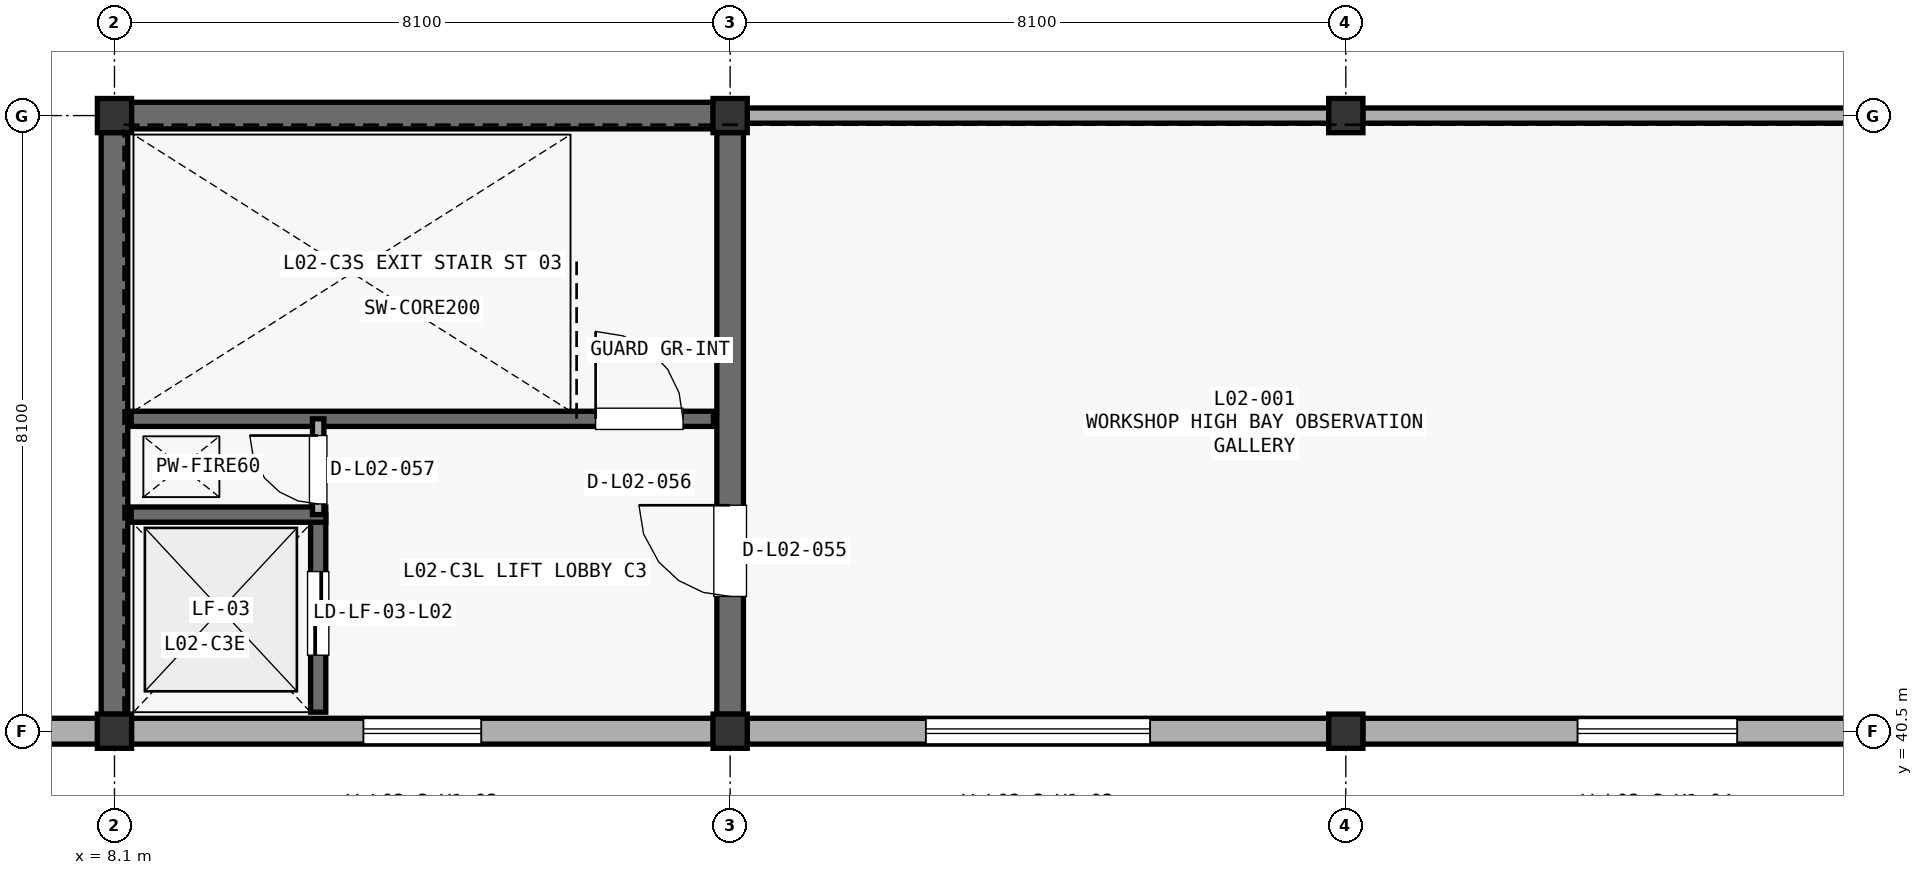
"""IFC4 building model, lengths in metres.
Left out: names, types, materials, properties, quantities, classifications, styles, units other than length and angle.
Written with IfcOpenShell. Run it as: python <this file> out.ifc"""

import sys

from ifc_helpers import new_model, si_unit, direction, frame, frame_2d, origin, origin_2d, place, context, subcontext, project, spatial, rectangle, extrude, element, fill, save


model = new_model("IFC4")
c1 = context("Model", 3, precision=1e-05, world=origin(), true_north=direction((0.0, 1.0)))
c2 = subcontext(c1, "Body", "Model", "MODEL_VIEW")
j1 = project(units=[si_unit("LENGTHUNIT", "METRE"), si_unit("PLANEANGLEUNIT", "RADIAN")], contexts=[c1])
p1 = place(None, origin())
s1 = spatial("IfcSite", under=j1, at=p1, CompositionType="ELEMENT")
p2 = place(p1, origin())
s2 = spatial("IfcBuilding", under=s1, at=p2, CompositionType="ELEMENT")
p3 = place(p2, frame((0.0, 0.0, 9.69)))
s3 = spatial("IfcBuildingStorey", under=s2, at=p3, CompositionType="ELEMENT", Elevation=9.69)
for number, where, z_axis, x_axis in (
    (1, (8.1, 40.5, 0.0), (0.0, 0.0, 1.0), (1.0, 0.0, 0.0)),
    (2, (8.1, 48.6, 0.0), (0.0, 0.0, 1.0), (1.0, 0.0, 0.0)),
    (3, (16.2, 40.5, 0.0), (0.0, 0.0, 1.0), (1.0, 0.0, 0.0)),
    (4, (16.2, 48.6, 0.0), (0.0, 0.0, 1.0), (1.0, 0.0, 0.0)),
    (5, (24.3, 40.5, 0.0), (0.0, 0.0, 1.0), (1.0, 0.0, 0.0)),
    (6, (24.3, 48.6, 0.0), (0.0, 0.0, 1.0), (1.0, 0.0, 0.0)),
):
    element("IfcColumn", number, at=place(p3, frame(where, z_axis=z_axis, x_axis=x_axis)), inside=s3, PredefinedType="COLUMN", context=c2, shape_type="SweptSolid", body=[
        extrude(rectangle(XDim=0.45, YDim=0.45, at=origin_2d()), origin(), (0.0, 0.0, 1.0), 4.42),
    ])
p4 = place(p3, frame((0.125, 40.5, -0.38), z_axis=(0.0, 0.0, 1.0), x_axis=(1.0, 0.0, 0.0)))
e7 = element("IfcWall", 7, at=p4, inside=s3, PredefinedType="STANDARD", context=c2, shape_type="SweptSolid", body=[
    extrude(rectangle(XDim=7.752, YDim=0.34, at=frame_2d((3.876, 0.0))), origin(), (0.0, 0.0, 1.0), 3.86),
])
p5 = place(p4, frame((2.826, 0.0, 1.63)))
e8 = element("IfcOpeningElement", 8, at=p5, cuts=e7, PredefinedType="OPENING", context=c2, shape_type="SweptSolid", body=[
    extrude(rectangle(XDim=2.1, YDim=1.5, at=frame_2d((1.05, 0.75))), frame((0.0, 0.18, 0.0), z_axis=(0.0, -1.0, 0.0), x_axis=(1.0, 0.0, 0.0)), (0.0, 0.0, 1.0), 0.36),
])
p6 = place(p3, frame((8.323, 40.5, 0.0), z_axis=(0.0, 0.0, 1.0), x_axis=(1.0, 0.0, 0.0)))
e9 = element("IfcWall", 9, at=p6, inside=s3, PredefinedType="STANDARD", context=c2, shape_type="SweptSolid", body=[
    extrude(rectangle(XDim=7.654, YDim=0.34, at=frame_2d((3.827, 0.0))), origin(), (0.0, 0.0, 1.0), 3.48),
])
p7 = place(p6, frame((3.052, 0.0, 1.25)))
e10 = element("IfcOpeningElement", 10, at=p7, cuts=e9, PredefinedType="OPENING", context=c2, shape_type="SweptSolid", body=[
    extrude(rectangle(XDim=1.55, YDim=1.8, at=frame_2d((0.775, 0.9))), frame((0.0, 0.18, 0.0), z_axis=(0.0, -1.0, 0.0), x_axis=(1.0, 0.0, 0.0)), (0.0, 0.0, 1.0), 0.36),
])
p8 = place(p3, frame((16.423, 40.5, 0.0), z_axis=(0.0, 0.0, 1.0), x_axis=(1.0, 0.0, 0.0)))
e11 = element("IfcWall", 11, at=p8, inside=s3, PredefinedType="STANDARD", context=c2, shape_type="SweptSolid", body=[
    extrude(rectangle(XDim=7.654, YDim=0.34, at=frame_2d((3.827, 0.0))), origin(), (0.0, 0.0, 1.0), 3.48),
])
p9 = place(p8, frame((2.352, 0.0, 1.25)))
e12 = element("IfcOpeningElement", 12, at=p9, cuts=e11, PredefinedType="OPENING", context=c2, shape_type="SweptSolid", body=[
    extrude(rectangle(XDim=2.95, YDim=1.8, at=frame_2d((1.475, 0.9))), frame((0.0, 0.18, 0.0), z_axis=(0.0, -1.0, 0.0), x_axis=(1.0, 0.0, 0.0)), (0.0, 0.0, 1.0), 0.36),
])
p10 = place(p3, frame((24.523, 40.5, 0.0), z_axis=(0.0, 0.0, 1.0), x_axis=(1.0, 0.0, 0.0)))
e13 = element("IfcWall", 13, at=p10, inside=s3, PredefinedType="STANDARD", context=c2, shape_type="SweptSolid", body=[
    extrude(rectangle(XDim=7.752, YDim=0.34, at=frame_2d((3.876, 0.0))), origin(), (0.0, 0.0, 1.0), 3.48),
])
p11 = place(p10, frame((2.826, 0.0, 1.25)))
e14 = element("IfcOpeningElement", 14, at=p11, cuts=e13, PredefinedType="OPENING", context=c2, shape_type="SweptSolid", body=[
    extrude(rectangle(XDim=2.1, YDim=1.5, at=frame_2d((1.05, 0.75))), frame((0.0, 0.18, 0.0), z_axis=(0.0, -1.0, 0.0), x_axis=(1.0, 0.0, 0.0)), (0.0, 0.0, 1.0), 0.36),
])
for number, where, z_axis, x_axis in (
    (15, (8.323, 48.6, 0.0), (0.0, 0.0, 1.0), (1.0, 0.0, 0.0)),
    (16, (8.1, 40.723, 0.0), (0.0, 0.0, 1.0), (0.0, 1.0, 0.0)),
):
    element("IfcWall", number, at=place(p3, frame(where, z_axis=z_axis, x_axis=x_axis)), inside=s3, PredefinedType="SHEAR", context=c2, shape_type="SweptSolid", body=[
        extrude(rectangle(XDim=7.654, YDim=0.35, at=frame_2d((3.827, 0.0))), origin(), (0.0, 0.0, 1.0), 4.142),
    ])
p12 = place(p3, frame((16.2, 40.723, 0.0), z_axis=(0.0, 0.0, 1.0), x_axis=(0.0, 1.0, 0.0)))
e17 = element("IfcWall", 17, at=p12, inside=s3, PredefinedType="SHEAR", context=c2, shape_type="SweptSolid", body=[
    extrude(rectangle(XDim=7.654, YDim=0.35, at=frame_2d((3.827, 0.0))), origin(), (0.0, 0.0, 1.0), 4.142),
])
p13 = place(p12, frame((1.55, 0.0, 0.0)))
e18 = element("IfcOpeningElement", 18, at=p13, cuts=e17, PredefinedType="OPENING", context=c2, shape_type="SweptSolid", body=[
    extrude(rectangle(XDim=1.2, YDim=2.2, at=frame_2d((0.6, 1.1))), frame((0.0, 0.185, 0.0), z_axis=(0.0, -1.0, 0.0), x_axis=(1.0, 0.0, 0.0)), (0.0, 0.0, 1.0), 0.37),
])
p14 = place(p3, frame((8.32, 44.61, 0.0), z_axis=(0.0, 0.0, 1.0), x_axis=(1.0, 0.0, 0.0)))
e19 = element("IfcWall", 19, at=p14, inside=s3, PredefinedType="SHEAR", context=c2, shape_type="SweptSolid", body=[
    extrude(rectangle(XDim=7.66, YDim=0.2, at=frame_2d((3.83, 0.0))), origin(), (0.0, 0.0, 1.0), 4.142),
])
p15 = place(p14, frame((6.11, 0.0, 0.0)))
e20 = element("IfcOpeningElement", 20, at=p15, cuts=e19, PredefinedType="OPENING", context=c2, shape_type="SweptSolid", body=[
    extrude(rectangle(XDim=1.15, YDim=2.2, at=frame_2d((0.575, 1.1))), frame((0.0, 0.11, 0.0), z_axis=(0.0, -1.0, 0.0), x_axis=(1.0, 0.0, 0.0)), (0.0, 0.0, 1.0), 0.22),
])
p16 = place(p3, frame((10.78, 40.75, 0.0), z_axis=(0.0, 0.0, 1.0), x_axis=(0.0, 1.0, 0.0)))
e21 = element("IfcWall", 21, at=p16, inside=s3, PredefinedType="SHEAR", context=c2, shape_type="SweptSolid", body=[
    extrude(rectangle(XDim=2.6, YDim=0.2, at=frame_2d((1.3, 0.0))), origin(), (0.0, 0.0, 1.0), 4.142),
])
p17 = place(p16, frame((0.75, 0.0, 0.0)))
e22 = element("IfcOpeningElement", 22, at=p17, cuts=e21, PredefinedType="OPENING", context=c2, shape_type="SweptSolid", body=[
    extrude(rectangle(XDim=1.1, YDim=2.2, at=frame_2d((0.55, 1.1))), frame((0.0, 0.11, 0.0), z_axis=(0.0, -1.0, 0.0), x_axis=(1.0, 0.0, 0.0)), (0.0, 0.0, 1.0), 0.22),
])
p18 = place(p3, frame((8.32, 43.35, 0.0), z_axis=(0.0, 0.0, 1.0), x_axis=(1.0, 0.0, 0.0)))
e23 = element("IfcWall", 23, at=p18, inside=s3, PredefinedType="SHEAR", context=c2, shape_type="SweptSolid", body=[
    extrude(rectangle(XDim=2.56, YDim=0.2, at=frame_2d((1.28, 0.0))), origin(), (0.0, 0.0, 1.0), 4.142),
])
p19 = place(p3, frame((10.78, 43.35, 0.0), z_axis=(0.0, 0.0, 1.0), x_axis=(0.0, 1.0, 0.0)))
e24 = element("IfcWall", 24, at=p19, inside=s3, PredefinedType="PARTITIONING", context=c2, shape_type="SweptSolid", body=[
    extrude(rectangle(XDim=1.26, YDim=0.15, at=frame_2d((0.63, 0.0))), origin(), (0.0, 0.0, 1.0), 4.142),
])
p20 = place(p19, frame((0.14, 0.0, 0.0)))
e25 = element("IfcOpeningElement", 25, at=p20, cuts=e24, PredefinedType="OPENING", context=c2, shape_type="SweptSolid", body=[
    extrude(rectangle(XDim=0.9, YDim=2.15, at=frame_2d((0.45, 1.075))), frame((0.0, 0.085, 0.0), z_axis=(0.0, -1.0, 0.0), x_axis=(1.0, 0.0, 0.0)), (0.0, 0.0, 1.0), 0.17),
])
p21 = place(p3, frame((16.423, 48.6, 0.0), z_axis=(0.0, 0.0, 1.0), x_axis=(1.0, 0.0, 0.0)))
e26 = element("IfcWall", 26, at=p21, inside=s3, PredefinedType="PARTITIONING", context=c2, shape_type="SweptSolid", body=[
    extrude(rectangle(XDim=7.654, YDim=0.2, at=frame_2d((3.827, 0.0))), origin(), (0.0, 0.0, 1.0), 4.142),
])
p22 = place(p3, frame((24.523, 48.6, 0.0), z_axis=(0.0, 0.0, 1.0), x_axis=(1.0, 0.0, 0.0)))
e27 = element("IfcWall", 27, at=p22, inside=s3, PredefinedType="PARTITIONING", context=c2, shape_type="SweptSolid", body=[
    extrude(rectangle(XDim=7.676, YDim=0.2, at=frame_2d((3.838, 0.0))), origin(), (0.0, 0.0, 1.0), 4.142),
])
p23 = place(p7, origin())
e28 = element("IfcWindow", 28, at=p23, inside=s3, PartitioningType="SINGLE_PANEL", PredefinedType="WINDOW", context=c2, shape_type="SweptSolid", body=[
    extrude(rectangle(XDim=1.55, YDim=1.8, at=frame_2d((0.775, 0.9))), frame((0.0, 0.03, 0.0), z_axis=(0.0, -1.0, 0.0), x_axis=(1.0, 0.0, 0.0)), (0.0, 0.0, 1.0), 0.06),
])
fill(e10, e28)
p24 = place(p9, origin())
e29 = element("IfcWindow", 29, at=p24, inside=s3, PartitioningType="SINGLE_PANEL", PredefinedType="WINDOW", context=c2, shape_type="SweptSolid", body=[
    extrude(rectangle(XDim=2.95, YDim=1.8, at=frame_2d((1.475, 0.9))), frame((0.0, 0.03, 0.0), z_axis=(0.0, -1.0, 0.0), x_axis=(1.0, 0.0, 0.0)), (0.0, 0.0, 1.0), 0.06),
])
fill(e12, e29)
p25 = place(p11, origin())
e30 = element("IfcWindow", 30, at=p25, inside=s3, PartitioningType="SINGLE_PANEL", PredefinedType="WINDOW", context=c2, shape_type="SweptSolid", body=[
    extrude(rectangle(XDim=2.1, YDim=1.5, at=frame_2d((1.05, 0.75))), frame((0.0, 0.03, 0.0), z_axis=(0.0, -1.0, 0.0), x_axis=(1.0, 0.0, 0.0)), (0.0, 0.0, 1.0), 0.06),
])
fill(e14, e30)
p26 = place(p13, origin())
e31 = element("IfcDoor", 31, at=p26, inside=s3, OperationType="SINGLE_SWING_RIGHT", PredefinedType="DOOR", context=c2, shape_type="SweptSolid", body=[
    extrude(rectangle(XDim=1.2, YDim=2.2, at=frame_2d((0.6, 1.1))), frame((0.0, 0.025, 0.0), z_axis=(0.0, -1.0, 0.0), x_axis=(1.0, 0.0, 0.0)), (0.0, 0.0, 1.0), 0.05),
])
fill(e18, e31)
p27 = place(p15, origin())
e32 = element("IfcDoor", 32, at=p27, inside=s3, OperationType="SINGLE_SWING_LEFT", PredefinedType="DOOR", context=c2, shape_type="SweptSolid", body=[
    extrude(rectangle(XDim=1.15, YDim=2.2, at=frame_2d((0.575, 1.1))), frame((0.0, 0.025, 0.0), z_axis=(0.0, -1.0, 0.0), x_axis=(1.0, 0.0, 0.0)), (0.0, 0.0, 1.0), 0.05),
])
fill(e20, e32)
p28 = place(p17, origin())
e33 = element("IfcDoor", 33, at=p28, inside=s3, OperationType="SLIDING_TO_LEFT", PredefinedType="DOOR", context=c2, shape_type="SweptSolid", body=[
    extrude(rectangle(XDim=1.1, YDim=2.2, at=frame_2d((0.55, 1.1))), frame((0.0, 0.025, 0.0), z_axis=(0.0, -1.0, 0.0), x_axis=(1.0, 0.0, 0.0)), (0.0, 0.0, 1.0), 0.05),
])
fill(e22, e33)
p29 = place(p20, origin())
e34 = element("IfcDoor", 34, at=p29, inside=s3, OperationType="SINGLE_SWING_RIGHT", PredefinedType="DOOR", context=c2, shape_type="SweptSolid", body=[
    extrude(rectangle(XDim=0.9, YDim=2.15, at=frame_2d((0.45, 1.075))), frame((0.0, 0.025, 0.0), z_axis=(0.0, -1.0, 0.0), x_axis=(1.0, 0.0, 0.0)), (0.0, 0.0, 1.0), 0.05),
])
fill(e25, e34)
save(model, sys.argv[1])
